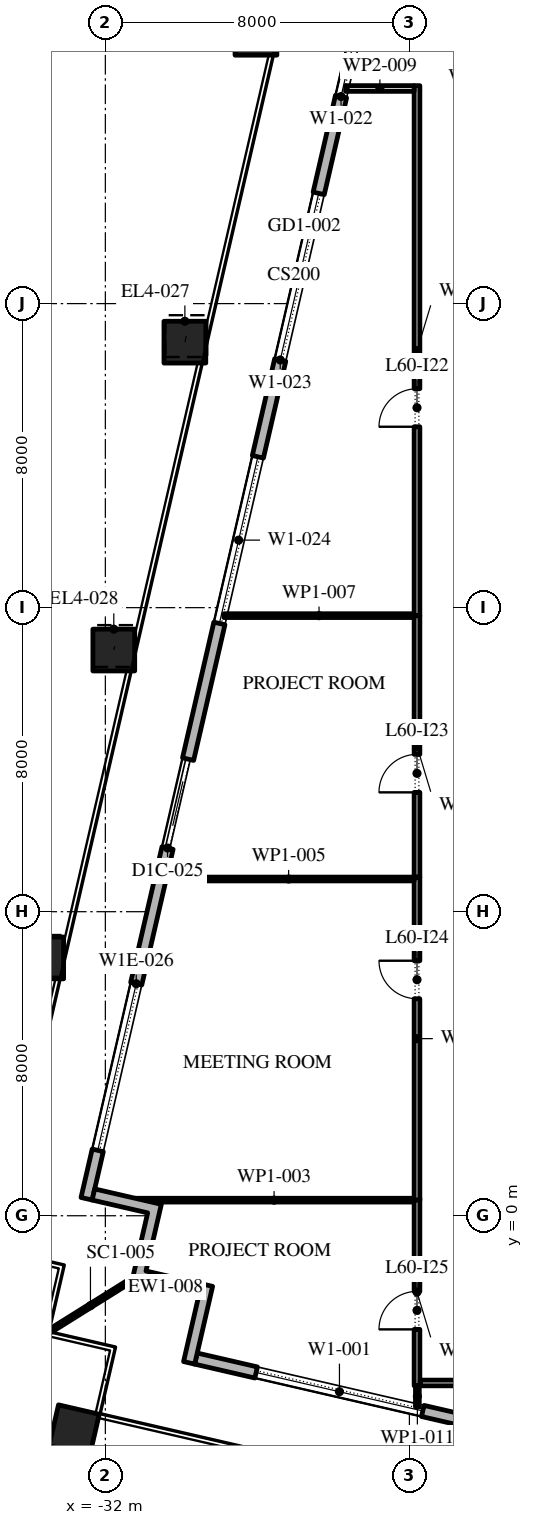
"""IFC4 building model, lengths in metres.
Left out: names, types, materials, properties, quantities, classifications, styles, units other than length and angle.
Written with IfcOpenShell. Run it as: python <this file> out.ifc"""

import sys

from ifc_helpers import new_model, si_unit, direction, frame, frame_2d, origin, origin_2d, place, context, subcontext, project, spatial, polyline, rectangle, outline, extrude, element, fill, save


model = new_model("IFC4")
c1 = context("Model", 3, precision=1e-05, world=origin(), true_north=direction((0.0, 1.0)))
c2 = subcontext(c1, "Body", "Model", "MODEL_VIEW")
j1 = project(units=[si_unit("LENGTHUNIT", "METRE"), si_unit("PLANEANGLEUNIT", "RADIAN")], contexts=[c1])
p1 = place(None, origin())
s1 = spatial("IfcSite", under=j1, at=p1, CompositionType="ELEMENT")
p2 = place(p1, origin())
s2 = spatial("IfcBuilding", under=s1, at=p2, CompositionType="ELEMENT")
p3 = place(p2, frame((0.0, 0.0, 276.6)))
s3 = spatial("IfcBuildingStorey", under=s2, at=p3, CompositionType="ELEMENT", Elevation=276.6)
p4 = place(p3, frame((-32.821, -5.635, 0.0), z_axis=(0.0, 0.0, 1.0), x_axis=(0.974370064785, -0.224951054344, 0.0)))
e1 = element("IfcColumn", 1, at=p4, inside=s3, PredefinedType="COLUMN", context=c2, shape_type="SweptSolid", body=[
    extrude(rectangle(XDim=1.1, YDim=1.1, at=origin_2d()), origin(), (0.0, 0.0, 1.0), 4.2),
])
p5 = place(p3, frame((-28.037, 31.087, 0.0), z_axis=(0.011668267153, 0.050562490995, 0.998652735462), x_axis=(-0.974391195695, 0.224859506699, 0.0)))
e2 = element("IfcColumn", 2, at=p5, inside=s3, PredefinedType="COLUMN", context=c2, shape_type="SweptSolid", body=[
    extrude(rectangle(XDim=1.1, YDim=1.1, at=origin_2d()), origin(), (0.0, 0.0, 1.0), 4.206),
])
p6 = place(p3, frame((-29.907, 22.986, 0.0), z_axis=(0.008770884695, 0.037929719907, 0.99924191662), x_axis=(-0.974290512438, 0.225295355862, 0.0)))
e3 = element("IfcColumn", 3, at=p6, inside=s3, PredefinedType="COLUMN", context=c2, shape_type="SweptSolid", body=[
    extrude(rectangle(XDim=1.1, YDim=1.1, at=origin_2d()), origin(), (0.0, 0.0, 1.0), 4.203),
])
p7 = place(p3, frame((-31.778, 14.885, 0.0), z_axis=(0.00581099252, 0.025219707538, 0.999665043261), x_axis=(-0.974466825284, 0.224531526563, 0.0)))
e4 = element("IfcColumn", 4, at=p7, inside=s3, PredefinedType="COLUMN", context=c2, shape_type="SweptSolid", body=[
    extrude(rectangle(XDim=1.1, YDim=1.1, at=origin_2d()), origin(), (0.0, 0.0, 1.0), 4.201),
])
p8 = place(p3, frame((-33.648, 6.783, 0.0), z_axis=(0.002964350345, 0.012613020097, 0.999916058652), x_axis=(-0.97347596985, 0.228789283237, 0.0)))
e5 = element("IfcColumn", 5, at=p8, inside=s3, PredefinedType="COLUMN", context=c2, shape_type="SweptSolid", body=[
    extrude(rectangle(XDim=1.1, YDim=1.1, at=origin_2d()), origin(), (0.0, 0.0, 1.0), 4.2),
])
p9 = place(p3, frame((-29.616, -3.758, 0.0), z_axis=(0.0, 0.0, 1.0), x_axis=(0.974370532314, -0.224949029246, 0.0)))
e6 = element("IfcWall", 6, at=p9, inside=s3, PredefinedType="STANDARD", context=c2, shape_type="SweptSolid", body=[
    extrude(rectangle(XDim=48.0, YDim=0.3, at=frame_2d((24.0, 0.0))), origin(), (0.0, 0.0, 1.0), 4.0),
])
p10 = place(p9, frame((1.625, 0.0, 0.45)))
e7 = element("IfcOpeningElement", 7, at=p10, cuts=e6, PredefinedType="OPENING", context=c2, shape_type="SweptSolid", body=[
    extrude(rectangle(XDim=4.5, YDim=3.05, at=frame_2d((2.25, 1.525))), frame((0.0, 0.16, 0.0), z_axis=(0.0, -1.0, 0.0), x_axis=(1.0, 0.0, 0.0)), (0.0, 0.0, 1.0), 0.32),
])
p11 = place(p9, frame((10.575, 0.0, 0.0)))
e8 = element("IfcOpeningElement", 8, at=p11, cuts=e6, PredefinedType="OPENING", context=c2, shape_type="SweptSolid", body=[
    extrude(rectangle(XDim=2.4, YDim=3.5, at=frame_2d((1.2, 1.75))), frame((0.0, 0.16, 0.0), z_axis=(0.0, -1.0, 0.0), x_axis=(1.0, 0.0, 0.0)), (0.0, 0.0, 1.0), 0.32),
])
p12 = place(p9, frame((17.575, 0.0, 0.45)))
e9 = element("IfcOpeningElement", 9, at=p12, cuts=e6, PredefinedType="OPENING", context=c2, shape_type="SweptSolid", body=[
    extrude(rectangle(XDim=4.5, YDim=3.0, at=frame_2d((2.25, 1.5))), frame((0.0, 0.16, 0.0), z_axis=(0.0, -1.0, 0.0), x_axis=(1.0, 0.0, 0.0)), (0.0, 0.0, 1.0), 0.32),
])
p13 = place(p9, frame((25.625, 0.0, 0.45)))
e10 = element("IfcOpeningElement", 10, at=p13, cuts=e6, PredefinedType="OPENING", context=c2, shape_type="SweptSolid", body=[
    extrude(rectangle(XDim=4.5, YDim=2.95, at=frame_2d((2.25, 1.475))), frame((0.0, 0.16, 0.0), z_axis=(0.0, -1.0, 0.0), x_axis=(1.0, 0.0, 0.0)), (0.0, 0.0, 1.0), 0.32),
])
p14 = place(p9, frame((33.675, 0.0, 0.45)))
e11 = element("IfcOpeningElement", 11, at=p14, cuts=e6, PredefinedType="OPENING", context=c2, shape_type="SweptSolid", body=[
    extrude(rectangle(XDim=4.5, YDim=2.825, at=frame_2d((2.25, 1.413))), frame((0.0, 0.16, 0.0), z_axis=(0.0, -1.0, 0.0), x_axis=(1.0, 0.0, 0.0)), (0.0, 0.0, 1.0), 0.32),
])
p15 = place(p9, frame((42.175, 0.0, 0.0)))
e12 = element("IfcOpeningElement", 12, at=p15, cuts=e6, PredefinedType="OPENING", context=c2, shape_type="SweptSolid", body=[
    extrude(rectangle(XDim=2.4, YDim=3.5, at=frame_2d((1.2, 1.75))), frame((0.0, 0.16, 0.0), z_axis=(0.0, -1.0, 0.0), x_axis=(1.0, 0.0, 0.0)), (0.0, 0.0, 1.0), 0.32),
])
p16 = place(p3, frame((-21.359, 48.678, 0.0), z_axis=(0.0, 0.0, 1.0), x_axis=(-0.224949198343, -0.974370493275, 0.0)))
e13 = element("IfcWall", 13, at=p16, inside=s3, PredefinedType="STANDARD", context=c2, shape_type="SweptSolid", body=[
    extrude(rectangle(XDim=49.5, YDim=0.3, at=frame_2d((24.75, 0.0))), origin(), (0.0, 0.0, 1.0), 4.0),
])
p17 = place(p16, frame((1.157, 0.0, 0.45)))
e14 = element("IfcOpeningElement", 14, at=p17, cuts=e13, PredefinedType="OPENING", context=c2, shape_type="SweptSolid", body=[
    extrude(rectangle(XDim=4.5, YDim=3.05, at=frame_2d((2.25, 1.525))), frame((0.0, 0.16, 0.0), z_axis=(0.0, -1.0, 0.0), x_axis=(1.0, 0.0, 0.0)), (0.0, 0.0, 1.0), 0.32),
])
p18 = place(p16, frame((9.171, 0.0, 0.0)))
e15 = element("IfcOpeningElement", 15, at=p18, cuts=e13, PredefinedType="OPENING", context=c2, shape_type="SweptSolid", body=[
    extrude(rectangle(XDim=2.4, YDim=3.5, at=frame_2d((1.2, 1.75))), frame((0.0, 0.16, 0.0), z_axis=(0.0, -1.0, 0.0), x_axis=(1.0, 0.0, 0.0)), (0.0, 0.0, 1.0), 0.32),
])
p19 = place(p16, frame((15.236, 0.0, 0.45)))
e16 = element("IfcOpeningElement", 16, at=p19, cuts=e13, PredefinedType="OPENING", context=c2, shape_type="SweptSolid", body=[
    extrude(rectangle(XDim=4.5, YDim=3.05, at=frame_2d((2.25, 1.525))), frame((0.0, 0.16, 0.0), z_axis=(0.0, -1.0, 0.0), x_axis=(1.0, 0.0, 0.0)), (0.0, 0.0, 1.0), 0.32),
])
p20 = place(p16, frame((22.35, 0.0, 0.45)))
e17 = element("IfcOpeningElement", 17, at=p20, cuts=e13, PredefinedType="OPENING", context=c2, shape_type="SweptSolid", body=[
    extrude(rectangle(XDim=4.5, YDim=3.05, at=frame_2d((2.25, 1.525))), frame((0.0, 0.16, 0.0), z_axis=(0.0, -1.0, 0.0), x_axis=(1.0, 0.0, 0.0)), (0.0, 0.0, 1.0), 0.32),
])
p21 = place(p16, frame((29.464, 0.0, 0.45)))
e18 = element("IfcOpeningElement", 18, at=p21, cuts=e13, PredefinedType="OPENING", context=c2, shape_type="SweptSolid", body=[
    extrude(rectangle(XDim=4.5, YDim=3.05, at=frame_2d((2.25, 1.525))), frame((0.0, 0.16, 0.0), z_axis=(0.0, -1.0, 0.0), x_axis=(1.0, 0.0, 0.0)), (0.0, 0.0, 1.0), 0.32),
])
p22 = place(p16, frame((37.628, 0.0, 0.0)))
e19 = element("IfcOpeningElement", 19, at=p22, cuts=e13, PredefinedType="OPENING", context=c2, shape_type="SweptSolid", body=[
    extrude(rectangle(XDim=2.4, YDim=3.325, at=frame_2d((1.2, 1.663))), frame((0.0, 0.16, 0.0), z_axis=(0.0, -1.0, 0.0), x_axis=(1.0, 0.0, 0.0)), (0.0, 0.0, 1.0), 0.32),
])
p23 = place(p16, frame((43.693, 0.0, 0.45)))
e20 = element("IfcOpeningElement", 20, at=p23, cuts=e13, PredefinedType="OPENING", context=c2, shape_type="SweptSolid", body=[
    extrude(rectangle(XDim=4.5, YDim=2.825, at=frame_2d((2.25, 1.413))), frame((0.0, 0.16, 0.0), z_axis=(0.0, -1.0, 0.0), x_axis=(1.0, 0.0, 0.0)), (0.0, 0.0, 1.0), 0.32),
])
p24 = place(p3, origin())
e21 = element("IfcWall", 21, at=p24, inside=s3, PredefinedType="STANDARD", context=c2, shape_type="SweptSolid", body=[
    extrude(outline(polyline([(-31.291, -1.678), (-30.886, 0.076), (-32.348, 0.413), (-32.28, 0.705), (-30.526, 0.301), (-30.931, -1.453), (-29.177, -1.858), (-29.65, -3.905), (-29.942, -3.837), (-29.537, -2.083), (-31.291, -1.678)])), origin(), (0.0, 0.0, 1.0), 4.0),
])
p25 = place(p3, frame((-31.291, -1.678, -0.05), z_axis=(0.0, 0.0, 1.0), x_axis=(-0.84807753525, -0.529872148923, 0.0)))
e22 = element("IfcWall", 22, at=p25, inside=s3, PredefinedType="STANDARD", context=c2, shape_type="SweptSolid", body=[
    extrude(rectangle(XDim=2.596, YDim=0.1, at=frame_2d((1.298, 0.0))), origin(), (0.0, 0.0, 1.0), 4.05),
])
p26 = place(p3, frame((-23.8, -4.475, 0.0), z_axis=(0.0, 0.0, 1.0), x_axis=(0.0, 1.0, 0.0)))
e23 = element("IfcWall", 23, at=p26, inside=s3, PredefinedType="PARTITIONING", context=c2, shape_type="SweptSolid", body=[
    extrude(rectangle(XDim=4.935, YDim=0.15, at=frame_2d((2.468, 0.0))), origin(), (0.0, 0.0, 1.0), 4.0),
])
p27 = place(p26, frame((1.485, 0.0, 0.0)))
e24 = element("IfcOpeningElement", 24, at=p27, cuts=e23, PredefinedType="OPENING", context=c2, shape_type="SweptSolid", body=[
    extrude(rectangle(XDim=1.0, YDim=2.1, at=frame_2d((0.5, 1.05))), frame((0.0, 0.085, 0.0), z_axis=(0.0, -1.0, 0.0), x_axis=(1.0, 0.0, 0.0)), (0.0, 0.0, 1.0), 0.17),
])
p28 = place(p3, frame((-23.875, 0.41, 0.0), z_axis=(0.0, 0.0, 1.0), x_axis=(-1.0, 0.0, 0.0)))
e25 = element("IfcWall", 25, at=p28, inside=s3, PredefinedType="PARTITIONING", context=c2, shape_type="SweptSolid", body=[
    extrude(rectangle(XDim=7.37, YDim=0.1, at=frame_2d((3.685, 0.0))), origin(), (0.0, 0.0, 1.0), 4.0),
])
p29 = place(p3, frame((-23.8, 0.41, 0.0), z_axis=(0.0, 0.0, 1.0), x_axis=(0.0, 1.0, 0.0)))
e26 = element("IfcWall", 26, at=p29, inside=s3, PredefinedType="PARTITIONING", context=c2, shape_type="SweptSolid", body=[
    extrude(rectangle(XDim=8.5, YDim=0.15, at=frame_2d((4.25, 0.0))), origin(), (0.0, 0.0, 1.0), 4.0),
])
p30 = place(p29, frame((5.3, 0.0, 0.0)))
e27 = element("IfcOpeningElement", 27, at=p30, cuts=e26, PredefinedType="OPENING", context=c2, shape_type="SweptSolid", body=[
    extrude(rectangle(XDim=1.0, YDim=2.1, at=frame_2d((0.5, 1.05))), frame((0.0, 0.085, 0.0), z_axis=(0.0, -1.0, 0.0), x_axis=(1.0, 0.0, 0.0)), (0.0, 0.0, 1.0), 0.17),
])
p31 = place(p3, frame((-23.875, 8.86, 0.0), z_axis=(0.0, 0.0, 1.0), x_axis=(-1.0, 0.0, 0.0)))
e28 = element("IfcWall", 28, at=p31, inside=s3, PredefinedType="PARTITIONING", context=c2, shape_type="SweptSolid", body=[
    extrude(rectangle(XDim=6.605, YDim=0.1, at=frame_2d((3.302, 0.0))), origin(), (0.0, 0.0, 1.0), 4.0),
])
p32 = place(p3, frame((-23.8, 8.91, 0.0), z_axis=(0.0, 0.0, 1.0), x_axis=(0.0, 1.0, 0.0)))
e29 = element("IfcWall", 29, at=p32, inside=s3, PredefinedType="PARTITIONING", context=c2, shape_type="SweptSolid", body=[
    extrude(rectangle(XDim=6.88, YDim=0.15, at=frame_2d((3.44, 0.0))), origin(), (0.0, 0.0, 1.0), 4.0),
])
p33 = place(p32, frame((2.23, 0.0, 0.0)))
e30 = element("IfcOpeningElement", 30, at=p33, cuts=e29, PredefinedType="OPENING", context=c2, shape_type="SweptSolid", body=[
    extrude(rectangle(XDim=1.0, YDim=2.1, at=frame_2d((0.5, 1.05))), frame((0.0, 0.085, 0.0), z_axis=(0.0, -1.0, 0.0), x_axis=(1.0, 0.0, 0.0)), (0.0, 0.0, 1.0), 0.17),
])
p34 = place(p3, frame((-23.875, 15.79, 0.0), z_axis=(0.0, 0.0, 1.0), x_axis=(-1.0, 0.0, 0.0)))
e31 = element("IfcWall", 31, at=p34, inside=s3, PredefinedType="PARTITIONING", context=c2, shape_type="SweptSolid", body=[
    extrude(rectangle(XDim=5.005, YDim=0.1, at=frame_2d((2.502, 0.0))), origin(), (0.0, 0.0, 1.0), 4.0),
])
p35 = place(p3, frame((-23.8, 15.79, 0.0), z_axis=(0.0, 0.0, 1.0), x_axis=(0.0, 1.0, 0.0)))
e32 = element("IfcWall", 32, at=p35, inside=s3, PredefinedType="PARTITIONING", context=c2, shape_type="SweptSolid", body=[
    extrude(rectangle(XDim=13.945, YDim=0.15, at=frame_2d((6.973, 0.0))), origin(), (0.0, 0.0, 1.0), 4.0),
])
p36 = place(p35, frame((4.97, 0.0, 0.0)))
e33 = element("IfcOpeningElement", 33, at=p36, cuts=e32, PredefinedType="OPENING", context=c2, shape_type="SweptSolid", body=[
    extrude(rectangle(XDim=1.0, YDim=2.1, at=frame_2d((0.5, 1.05))), frame((0.0, 0.085, 0.0), z_axis=(0.0, -1.0, 0.0), x_axis=(1.0, 0.0, 0.0)), (0.0, 0.0, 1.0), 0.17),
])
p37 = place(p3, frame((-23.875, 29.66, 0.0), z_axis=(0.0, 0.0, 1.0), x_axis=(-1.0, 0.0, 0.0)))
e34 = element("IfcWall", 34, at=p37, inside=s3, PredefinedType="PARTITIONING", context=c2, shape_type="SweptSolid", body=[
    extrude(rectangle(XDim=1.803, YDim=0.15, at=frame_2d((0.901, 0.0))), origin(), (0.0, 0.0, 1.0), 4.0),
])
p38 = place(p3, frame((-23.79, -5.032, 0.0), z_axis=(0.0, 0.0, 1.0), x_axis=(0.0, 1.0, 0.0)))
e35 = element("IfcWall", 35, at=p38, inside=s3, PredefinedType="PARTITIONING", context=c2, shape_type="SweptSolid", body=[
    extrude(rectangle(XDim=0.557, YDim=0.1, at=frame_2d((0.278, 0.0))), origin(), (0.0, 0.0, 1.0), 4.0),
])
p39 = place(p3, frame((-10.075, -4.4, 0.0), z_axis=(0.0, 0.0, 1.0), x_axis=(-1.0, 0.0, 0.0)))
e36 = element("IfcWall", 36, at=p39, inside=s3, PredefinedType="PARTITIONING", context=c2, shape_type="SweptSolid", body=[
    extrude(rectangle(XDim=13.64, YDim=0.15, at=frame_2d((6.82, 0.0))), origin(), (0.0, 0.0, 1.0), 4.0),
])
p40 = place(p39, frame((9.065, 0.0, 0.0)))
e37 = element("IfcOpeningElement", 37, at=p40, cuts=e36, PredefinedType="OPENING", context=c2, shape_type="SweptSolid", body=[
    extrude(rectangle(XDim=1.0, YDim=2.1, at=frame_2d((0.5, 1.05))), frame((0.0, 0.085, 0.0), z_axis=(0.0, -1.0, 0.0), x_axis=(1.0, 0.0, 0.0)), (0.0, 0.0, 1.0), 0.17),
])
p41 = place(p10, origin())
e38 = element("IfcWindow", 38, at=p41, inside=s3, PartitioningType="DOUBLE_PANEL_VERTICAL", PredefinedType="WINDOW", context=c2, shape_type="SweptSolid", body=[
    extrude(rectangle(XDim=4.5, YDim=3.05, at=frame_2d((2.25, 1.525))), frame((0.0, 0.03, 0.0), z_axis=(0.0, -1.0, 0.0), x_axis=(1.0, 0.0, 0.0)), (0.0, 0.0, 1.0), 0.06),
])
fill(e7, e38)
p42 = place(p19, origin())
e39 = element("IfcWindow", 39, at=p42, inside=s3, PartitioningType="DOUBLE_PANEL_VERTICAL", PredefinedType="WINDOW", context=c2, shape_type="SweptSolid", body=[
    extrude(rectangle(XDim=4.5, YDim=3.05, at=frame_2d((2.25, 1.525))), frame((0.0, 0.03, 0.0), z_axis=(0.0, -1.0, 0.0), x_axis=(1.0, 0.0, 0.0)), (0.0, 0.0, 1.0), 0.06),
])
fill(e16, e39)
p43 = place(p20, origin())
e40 = element("IfcWindow", 40, at=p43, inside=s3, PartitioningType="DOUBLE_PANEL_VERTICAL", PredefinedType="WINDOW", context=c2, shape_type="SweptSolid", body=[
    extrude(rectangle(XDim=4.5, YDim=3.05, at=frame_2d((2.25, 1.525))), frame((0.0, 0.03, 0.0), z_axis=(0.0, -1.0, 0.0), x_axis=(1.0, 0.0, 0.0)), (0.0, 0.0, 1.0), 0.06),
])
fill(e17, e40)
p44 = place(p21, origin())
e41 = element("IfcWindow", 41, at=p44, inside=s3, PartitioningType="DOUBLE_PANEL_VERTICAL", PredefinedType="WINDOW", context=c2, shape_type="SweptSolid", body=[
    extrude(rectangle(XDim=4.5, YDim=3.05, at=frame_2d((2.25, 1.525))), frame((0.0, 0.03, 0.0), z_axis=(0.0, -1.0, 0.0), x_axis=(1.0, 0.0, 0.0)), (0.0, 0.0, 1.0), 0.06),
])
fill(e18, e41)
p45 = place(p22, origin())
e42 = element("IfcDoor", 42, at=p45, inside=s3, OperationType="DOUBLE_DOOR_SLIDING", PredefinedType="DOOR", context=c2, shape_type="SweptSolid", body=[
    extrude(rectangle(XDim=2.4, YDim=3.325, at=frame_2d((1.2, 1.663))), frame((0.0, 0.025, 0.0), z_axis=(0.0, -1.0, 0.0), x_axis=(1.0, 0.0, 0.0)), (0.0, 0.0, 1.0), 0.05),
])
fill(e19, e42)
p46 = place(p23, origin())
e43 = element("IfcWindow", 43, at=p46, inside=s3, PartitioningType="DOUBLE_PANEL_VERTICAL", PredefinedType="WINDOW", context=c2, shape_type="SweptSolid", body=[
    extrude(rectangle(XDim=4.5, YDim=2.825, at=frame_2d((2.25, 1.413))), frame((0.0, 0.03, 0.0), z_axis=(0.0, -1.0, 0.0), x_axis=(1.0, 0.0, 0.0)), (0.0, 0.0, 1.0), 0.06),
])
fill(e20, e43)
p47 = place(p36, origin())
e44 = element("IfcDoor", 44, at=p47, inside=s3, OperationType="SINGLE_SWING_RIGHT", PredefinedType="DOOR", context=c2, shape_type="SweptSolid", body=[
    extrude(rectangle(XDim=1.0, YDim=2.1, at=frame_2d((0.5, 1.05))), frame((0.0, 0.025, 0.0), z_axis=(0.0, -1.0, 0.0), x_axis=(1.0, 0.0, 0.0)), (0.0, 0.0, 1.0), 0.05),
])
fill(e33, e44)
p48 = place(p33, origin())
e45 = element("IfcDoor", 45, at=p48, inside=s3, OperationType="SINGLE_SWING_RIGHT", PredefinedType="DOOR", context=c2, shape_type="SweptSolid", body=[
    extrude(rectangle(XDim=1.0, YDim=2.1, at=frame_2d((0.5, 1.05))), frame((0.0, 0.025, 0.0), z_axis=(0.0, -1.0, 0.0), x_axis=(1.0, 0.0, 0.0)), (0.0, 0.0, 1.0), 0.05),
])
fill(e30, e45)
p49 = place(p30, origin())
e46 = element("IfcDoor", 46, at=p49, inside=s3, OperationType="SINGLE_SWING_LEFT", PredefinedType="DOOR", context=c2, shape_type="SweptSolid", body=[
    extrude(rectangle(XDim=1.0, YDim=2.1, at=frame_2d((0.5, 1.05))), frame((0.0, 0.025, 0.0), z_axis=(0.0, -1.0, 0.0), x_axis=(1.0, 0.0, 0.0)), (0.0, 0.0, 1.0), 0.05),
])
fill(e27, e46)
p50 = place(p27, origin())
e47 = element("IfcDoor", 47, at=p50, inside=s3, OperationType="SINGLE_SWING_RIGHT", PredefinedType="DOOR", context=c2, shape_type="SweptSolid", body=[
    extrude(rectangle(XDim=1.0, YDim=2.1, at=frame_2d((0.5, 1.05))), frame((0.0, 0.025, 0.0), z_axis=(0.0, -1.0, 0.0), x_axis=(1.0, 0.0, 0.0)), (0.0, 0.0, 1.0), 0.05),
])
fill(e24, e47)
save(model, sys.argv[1])
